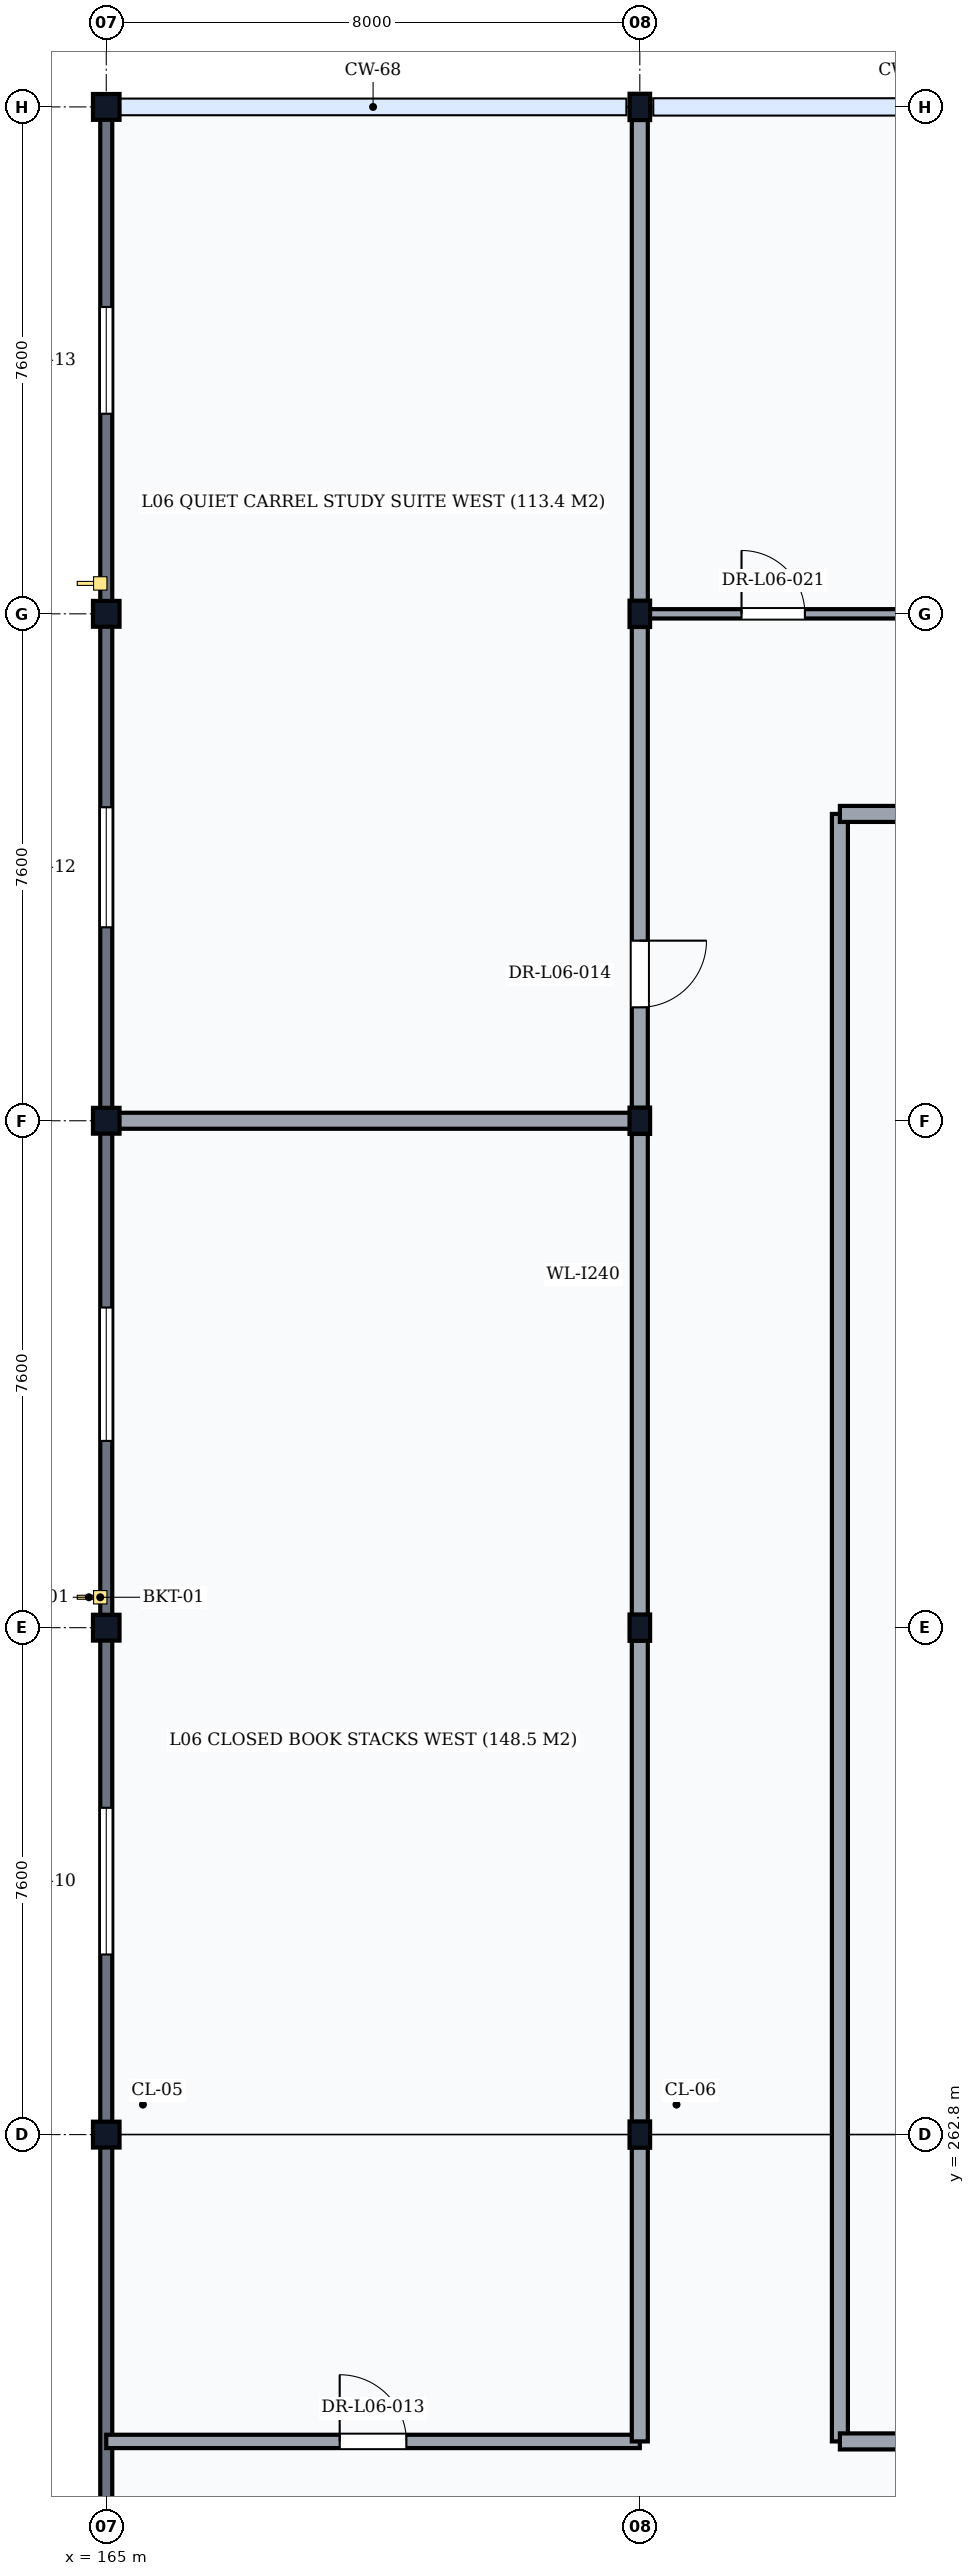
"""IFC4 building model, lengths in metres.
Left out: names, types, materials, properties, quantities, classifications, styles, units other than length and angle.
Written with IfcOpenShell. Run it as: python <this file> out.ifc"""

import sys

from ifc_helpers import new_model, si_unit, direction, frame, frame_2d, origin, origin_2d, place, context, subcontext, project, spatial, rectangle, i_section, extrude, element, fill, save


model = new_model("IFC4")
c1 = context("Model", 3, precision=1e-05, world=origin(), true_north=direction((0.0, 1.0)))
c2 = subcontext(c1, "Body", "Model", "MODEL_VIEW")
j1 = project(units=[si_unit("LENGTHUNIT", "METRE"), si_unit("PLANEANGLEUNIT", "RADIAN")], contexts=[c1])
p1 = place(None, origin())
s1 = spatial("IfcSite", under=j1, at=p1, CompositionType="ELEMENT")
p2 = place(p1, origin())
s2 = spatial("IfcBuilding", under=s1, at=p2, CompositionType="ELEMENT")
p3 = place(p2, frame((0.0, 0.0, 24.3)))
s3 = spatial("IfcBuildingStorey", under=s2, at=p3, CompositionType="ELEMENT", Elevation=24.3)
for number, where, z_axis, x_axis in (
    (1, (165.0, 262.8, 0.0), (0.0, 0.0, 1.0), (1.0, 0.0, 0.0)),
    (2, (165.0, 270.4, 0.0), (0.0, 0.0, 1.0), (1.0, 0.0, 0.0)),
    (3, (165.0, 278.0, 0.0), (0.0, 0.0, 1.0), (1.0, 0.0, 0.0)),
    (4, (165.0, 285.6, 0.0), (0.0, 0.0, 1.0), (1.0, 0.0, 0.0)),
    (5, (165.0, 293.2, 0.0), (0.0, 0.0, 1.0), (1.0, 0.0, 0.0)),
):
    element("IfcColumn", number, at=place(p3, frame(where, z_axis=z_axis, x_axis=x_axis)), inside=s3, PredefinedType="COLUMN", context=c2, shape_type="SweptSolid", body=[
        extrude(i_section(OverallWidth=0.398, OverallDepth=0.387, WebThickness=0.021, FlangeThickness=0.033, FilletRadius=0.015, at=origin_2d()), origin(), (0.0, 0.0, 1.0), 3.9),
    ])
for number, where, z_axis, x_axis in (
    (6, (173.0, 262.8, 0.0), (0.0, 0.0, 1.0), (1.0, 0.0, 0.0)),
    (7, (173.0, 270.4, 0.0), (0.0, 0.0, 1.0), (1.0, 0.0, 0.0)),
    (8, (173.0, 278.0, 0.0), (0.0, 0.0, 1.0), (1.0, 0.0, 0.0)),
    (9, (173.0, 285.6, 0.0), (0.0, 0.0, 1.0), (1.0, 0.0, 0.0)),
    (10, (173.0, 293.2, 0.0), (0.0, 0.0, 1.0), (1.0, 0.0, 0.0)),
):
    element("IfcColumn", number, at=place(p3, frame(where, z_axis=z_axis, x_axis=x_axis)), inside=s3, PredefinedType="COLUMN", context=c2, shape_type="SweptSolid", body=[
        extrude(i_section(OverallWidth=0.308, OverallDepth=0.395, WebThickness=0.021, FlangeThickness=0.04, FilletRadius=0.027, at=origin_2d()), origin(), (0.0, 0.0, 1.0), 3.9),
    ])
p4 = place(p3, frame((165.0, 255.206, 0.0), z_axis=(0.0, 0.0, 1.0), x_axis=(0.0, 1.0, 0.0)))
e11 = element("IfcWall", 11, at=p4, inside=s3, PredefinedType="SOLIDWALL", context=c2, shape_type="SweptSolid", body=[
    extrude(rectangle(XDim=7.588, YDim=0.18, at=frame_2d((3.794, 0.0))), origin(), (0.0, 0.0, 1.0), 3.388),
])
p5 = place(p3, frame((165.0, 262.806, 0.0), z_axis=(0.0, 0.0, 1.0), x_axis=(0.0, 1.0, 0.0)))
e12 = element("IfcWall", 12, at=p5, inside=s3, PredefinedType="SOLIDWALL", context=c2, shape_type="SweptSolid", body=[
    extrude(rectangle(XDim=7.588, YDim=0.18, at=frame_2d((3.794, 0.0))), origin(), (0.0, 0.0, 1.0), 3.388),
])
p6 = place(p5, frame((2.694, 0.0, 0.95)))
e13 = element("IfcOpeningElement", 13, at=p6, cuts=e12, PredefinedType="OPENING", context=c2, shape_type="SweptSolid", body=[
    extrude(rectangle(XDim=2.2, YDim=2.1, at=frame_2d((1.1, 1.05))), frame((0.0, 0.105, 0.0), z_axis=(0.0, -1.0, 0.0), x_axis=(1.0, 0.0, 0.0)), (0.0, 0.0, 1.0), 0.21),
])
p7 = place(p3, frame((165.0, 270.406, 0.0), z_axis=(0.0, 0.0, 1.0), x_axis=(0.0, 1.0, 0.0)))
e14 = element("IfcWall", 14, at=p7, inside=s3, PredefinedType="SOLIDWALL", context=c2, shape_type="SweptSolid", body=[
    extrude(rectangle(XDim=7.588, YDim=0.18, at=frame_2d((3.794, 0.0))), origin(), (0.0, 0.0, 1.0), 3.388),
])
p8 = place(p7, frame((2.794, 0.0, 0.95)))
e15 = element("IfcOpeningElement", 15, at=p8, cuts=e14, PredefinedType="OPENING", context=c2, shape_type="SweptSolid", body=[
    extrude(rectangle(XDim=2.0, YDim=2.1, at=frame_2d((1.0, 1.05))), frame((0.0, 0.105, 0.0), z_axis=(0.0, -1.0, 0.0), x_axis=(1.0, 0.0, 0.0)), (0.0, 0.0, 1.0), 0.21),
])
p9 = place(p3, frame((165.0, 278.006, 0.0), z_axis=(0.0, 0.0, 1.0), x_axis=(0.0, 1.0, 0.0)))
e16 = element("IfcWall", 16, at=p9, inside=s3, PredefinedType="SOLIDWALL", context=c2, shape_type="SweptSolid", body=[
    extrude(rectangle(XDim=7.588, YDim=0.18, at=frame_2d((3.794, 0.0))), origin(), (0.0, 0.0, 1.0), 3.388),
])
p10 = place(p9, frame((2.894, 0.0, 0.95)))
e17 = element("IfcOpeningElement", 17, at=p10, cuts=e16, PredefinedType="OPENING", context=c2, shape_type="SweptSolid", body=[
    extrude(rectangle(XDim=1.8, YDim=2.0, at=frame_2d((0.9, 1.0))), frame((0.0, 0.105, 0.0), z_axis=(0.0, -1.0, 0.0), x_axis=(1.0, 0.0, 0.0)), (0.0, 0.0, 1.0), 0.21),
])
p11 = place(p3, frame((165.0, 285.606, 0.0), z_axis=(0.0, 0.0, 1.0), x_axis=(0.0, 1.0, 0.0)))
e18 = element("IfcWall", 18, at=p11, inside=s3, PredefinedType="SOLIDWALL", context=c2, shape_type="SweptSolid", body=[
    extrude(rectangle(XDim=7.588, YDim=0.18, at=frame_2d((3.794, 0.0))), origin(), (0.0, 0.0, 1.0), 3.388),
])
p12 = place(p11, frame((2.994, 0.0, 0.95)))
e19 = element("IfcOpeningElement", 19, at=p12, cuts=e18, PredefinedType="OPENING", context=c2, shape_type="SweptSolid", body=[
    extrude(rectangle(XDim=1.6, YDim=2.0, at=frame_2d((0.8, 1.0))), frame((0.0, 0.105, 0.0), z_axis=(0.0, -1.0, 0.0), x_axis=(1.0, 0.0, 0.0)), (0.0, 0.0, 1.0), 0.21),
])
p13 = place(p3, frame((165.0, 258.2, 0.0), z_axis=(0.0, 0.0, 1.0), x_axis=(1.0, 0.0, 0.0)))
e20 = element("IfcWall", 20, at=p13, inside=s3, PredefinedType="PARTITIONING", context=c2, shape_type="SweptSolid", body=[
    extrude(rectangle(XDim=8.0, YDim=0.2, at=frame_2d((4.0, 0.0))), origin(), (0.0, 0.0, 1.0), 3.66),
])
p14 = place(p13, frame((3.5, 0.0, 0.0)))
e21 = element("IfcOpeningElement", 21, at=p14, cuts=e20, PredefinedType="OPENING", context=c2, shape_type="SweptSolid", body=[
    extrude(rectangle(XDim=1.0, YDim=2.1, at=frame_2d((0.5, 1.05))), frame((0.0, 0.115, 0.0), z_axis=(0.0, -1.0, 0.0), x_axis=(1.0, 0.0, 0.0)), (0.0, 0.0, 1.0), 0.23),
])
p15 = place(p3, frame((173.0, 258.2, 0.0), z_axis=(0.0, 0.0, 1.0), x_axis=(0.0, 1.0, 0.0)))
e22 = element("IfcWall", 22, at=p15, inside=s3, PredefinedType="PARTITIONING", context=c2, shape_type="SweptSolid", body=[
    extrude(rectangle(XDim=35.0, YDim=0.24, at=frame_2d((17.5, 0.0))), origin(), (0.0, 0.0, 1.0), 3.208),
])
p16 = place(p15, frame((21.5, 0.0, 0.0)))
e23 = element("IfcOpeningElement", 23, at=p16, cuts=e22, PredefinedType="OPENING", context=c2, shape_type="SweptSolid", body=[
    extrude(rectangle(XDim=1.0, YDim=2.1, at=frame_2d((0.5, 1.05))), frame((0.0, 0.135, 0.0), z_axis=(0.0, -1.0, 0.0), x_axis=(1.0, 0.0, 0.0)), (0.0, 0.0, 1.0), 0.27),
])
p17 = place(p3, frame((165.0, 278.0, 0.0), z_axis=(0.0, 0.0, 1.0), x_axis=(1.0, 0.0, 0.0)))
e24 = element("IfcWall", 24, at=p17, inside=s3, PredefinedType="PARTITIONING", context=c2, shape_type="SweptSolid", body=[
    extrude(rectangle(XDim=8.0, YDim=0.24, at=frame_2d((4.0, 0.0))), origin(), (0.0, 0.0, 1.0), 3.058),
])
p18 = place(p3, frame((176.0, 258.2, 0.0), z_axis=(0.0, 0.0, 1.0), x_axis=(0.0, 1.0, 0.0)))
e25 = element("IfcWall", 25, at=p18, inside=s3, PredefinedType="PARTITIONING", context=c2, shape_type="SweptSolid", body=[
    extrude(rectangle(XDim=24.4, YDim=0.24, at=frame_2d((12.2, 0.0))), origin(), (0.0, 0.0, 1.0), 3.66),
])
p19 = place(p3, frame((176.0, 258.2, 0.0), z_axis=(0.0, 0.0, 1.0), x_axis=(1.0, 0.0, 0.0)))
e26 = element("IfcWall", 26, at=p19, inside=s3, PredefinedType="PARTITIONING", context=c2, shape_type="SweptSolid", body=[
    extrude(rectangle(XDim=45.0, YDim=0.24, at=frame_2d((22.5, 0.0))), origin(), (0.0, 0.0, 1.0), 3.66),
])
p20 = place(p19, frame((5.8, 0.0, 0.0)))
e27 = element("IfcOpeningElement", 27, at=p20, cuts=e26, PredefinedType="OPENING", context=c2, shape_type="SweptSolid", body=[
    extrude(rectangle(XDim=1.4, YDim=2.1, at=frame_2d((0.7, 1.05))), frame((0.0, 0.135, 0.0), z_axis=(0.0, -1.0, 0.0), x_axis=(1.0, 0.0, 0.0)), (0.0, 0.0, 1.0), 0.27),
])
p21 = place(p19, frame((19.06, 0.0, 0.0)))
e28 = element("IfcOpeningElement", 28, at=p21, cuts=e26, PredefinedType="OPENING", context=c2, shape_type="SweptSolid", body=[
    extrude(rectangle(XDim=1.4, YDim=2.1, at=frame_2d((0.7, 1.05))), frame((0.0, 0.135, 0.0), z_axis=(0.0, -1.0, 0.0), x_axis=(1.0, 0.0, 0.0)), (0.0, 0.0, 1.0), 0.27),
])
p22 = place(p19, frame((35.06, 0.0, 0.0)))
e29 = element("IfcOpeningElement", 29, at=p22, cuts=e26, PredefinedType="OPENING", context=c2, shape_type="SweptSolid", body=[
    extrude(rectangle(XDim=1.4, YDim=2.1, at=frame_2d((0.7, 1.05))), frame((0.0, 0.135, 0.0), z_axis=(0.0, -1.0, 0.0), x_axis=(1.0, 0.0, 0.0)), (0.0, 0.0, 1.0), 0.27),
])
p23 = place(p3, frame((176.0, 282.6, 0.0), z_axis=(0.0, 0.0, 1.0), x_axis=(1.0, 0.0, 0.0)))
e30 = element("IfcWall", 30, at=p23, inside=s3, PredefinedType="PARTITIONING", context=c2, shape_type="SweptSolid", body=[
    extrude(rectangle(XDim=45.0, YDim=0.24, at=frame_2d((22.5, 0.0))), origin(), (0.0, 0.0, 1.0), 3.66),
])
p24 = place(p23, frame((6.0, 0.0, 0.0)))
e31 = element("IfcOpeningElement", 31, at=p24, cuts=e30, PredefinedType="OPENING", context=c2, shape_type="SweptSolid", body=[
    extrude(rectangle(XDim=1.0, YDim=2.1, at=frame_2d((0.5, 1.05))), frame((0.0, 0.135, 0.0), z_axis=(0.0, -1.0, 0.0), x_axis=(1.0, 0.0, 0.0)), (0.0, 0.0, 1.0), 0.27),
])
p25 = place(p23, frame((19.46, 0.0, 0.0)))
e32 = element("IfcOpeningElement", 32, at=p25, cuts=e30, PredefinedType="OPENING", context=c2, shape_type="SweptSolid", body=[
    extrude(rectangle(XDim=1.0, YDim=2.1, at=frame_2d((0.5, 1.05))), frame((0.0, 0.135, 0.0), z_axis=(0.0, -1.0, 0.0), x_axis=(1.0, 0.0, 0.0)), (0.0, 0.0, 1.0), 0.27),
])
p26 = place(p23, frame((35.46, 0.0, 0.0)))
e33 = element("IfcOpeningElement", 33, at=p26, cuts=e30, PredefinedType="OPENING", context=c2, shape_type="SweptSolid", body=[
    extrude(rectangle(XDim=1.0, YDim=2.1, at=frame_2d((0.5, 1.05))), frame((0.0, 0.135, 0.0), z_axis=(0.0, -1.0, 0.0), x_axis=(1.0, 0.0, 0.0)), (0.0, 0.0, 1.0), 0.27),
])
p27 = place(p3, frame((173.0, 285.6, 0.0), z_axis=(0.0, 0.0, 1.0), x_axis=(1.0, 0.0, 0.0)))
e34 = element("IfcWall", 34, at=p27, inside=s3, PredefinedType="PARTITIONING", context=c2, shape_type="SweptSolid", body=[
    extrude(rectangle(XDim=48.0, YDim=0.14, at=frame_2d((24.0, 0.0))), origin(), (0.0, 0.0, 1.0), 3.058),
])
p28 = place(p27, frame((1.525, 0.0, 0.0)))
e35 = element("IfcOpeningElement", 35, at=p28, cuts=e34, PredefinedType="OPENING", context=c2, shape_type="SweptSolid", body=[
    extrude(rectangle(XDim=0.95, YDim=2.1, at=frame_2d((0.475, 1.05))), frame((0.0, 0.085, 0.0), z_axis=(0.0, -1.0, 0.0), x_axis=(1.0, 0.0, 0.0)), (0.0, 0.0, 1.0), 0.17),
])
p29 = place(p27, frame((5.525, 0.0, 0.0)))
e36 = element("IfcOpeningElement", 36, at=p29, cuts=e34, PredefinedType="OPENING", context=c2, shape_type="SweptSolid", body=[
    extrude(rectangle(XDim=0.95, YDim=2.1, at=frame_2d((0.475, 1.05))), frame((0.0, 0.085, 0.0), z_axis=(0.0, -1.0, 0.0), x_axis=(1.0, 0.0, 0.0)), (0.0, 0.0, 1.0), 0.17),
])
p30 = place(p27, frame((11.25, 0.0, 0.0)))
e37 = element("IfcOpeningElement", 37, at=p30, cuts=e34, PredefinedType="OPENING", context=c2, shape_type="SweptSolid", body=[
    extrude(rectangle(XDim=1.5, YDim=2.25, at=frame_2d((0.75, 1.125))), frame((0.0, 0.085, 0.0), z_axis=(0.0, -1.0, 0.0), x_axis=(1.0, 0.0, 0.0)), (0.0, 0.0, 1.0), 0.17),
])
p31 = place(p27, frame((17.525, 0.0, 0.0)))
e38 = element("IfcOpeningElement", 38, at=p31, cuts=e34, PredefinedType="OPENING", context=c2, shape_type="SweptSolid", body=[
    extrude(rectangle(XDim=0.95, YDim=2.1, at=frame_2d((0.475, 1.05))), frame((0.0, 0.085, 0.0), z_axis=(0.0, -1.0, 0.0), x_axis=(1.0, 0.0, 0.0)), (0.0, 0.0, 1.0), 0.17),
])
p32 = place(p27, frame((21.525, 0.0, 0.0)))
e39 = element("IfcOpeningElement", 39, at=p32, cuts=e34, PredefinedType="OPENING", context=c2, shape_type="SweptSolid", body=[
    extrude(rectangle(XDim=0.95, YDim=2.1, at=frame_2d((0.475, 1.05))), frame((0.0, 0.085, 0.0), z_axis=(0.0, -1.0, 0.0), x_axis=(1.0, 0.0, 0.0)), (0.0, 0.0, 1.0), 0.17),
])
p33 = place(p27, frame((27.525, 0.0, 0.0)))
e40 = element("IfcOpeningElement", 40, at=p33, cuts=e34, PredefinedType="OPENING", context=c2, shape_type="SweptSolid", body=[
    extrude(rectangle(XDim=0.95, YDim=2.1, at=frame_2d((0.475, 1.05))), frame((0.0, 0.085, 0.0), z_axis=(0.0, -1.0, 0.0), x_axis=(1.0, 0.0, 0.0)), (0.0, 0.0, 1.0), 0.17),
])
p34 = place(p27, frame((35.25, 0.0, 0.0)))
e41 = element("IfcOpeningElement", 41, at=p34, cuts=e34, PredefinedType="OPENING", context=c2, shape_type="SweptSolid", body=[
    extrude(rectangle(XDim=1.5, YDim=2.25, at=frame_2d((0.75, 1.125))), frame((0.0, 0.085, 0.0), z_axis=(0.0, -1.0, 0.0), x_axis=(1.0, 0.0, 0.0)), (0.0, 0.0, 1.0), 0.17),
])
p35 = place(p27, frame((43.525, 0.0, 0.0)))
e42 = element("IfcOpeningElement", 42, at=p35, cuts=e34, PredefinedType="OPENING", context=c2, shape_type="SweptSolid", body=[
    extrude(rectangle(XDim=0.95, YDim=2.1, at=frame_2d((0.475, 1.05))), frame((0.0, 0.085, 0.0), z_axis=(0.0, -1.0, 0.0), x_axis=(1.0, 0.0, 0.0)), (0.0, 0.0, 1.0), 0.17),
])
p36 = place(p6, origin())
e43 = element("IfcWindow", 43, at=p36, inside=s3, PartitioningType="DOUBLE_PANEL_VERTICAL", PredefinedType="WINDOW", context=c2, shape_type="SweptSolid", body=[
    extrude(rectangle(XDim=2.2, YDim=2.1, at=frame_2d((1.1, 1.05))), frame((0.0, 0.03, 0.0), z_axis=(0.0, -1.0, 0.0), x_axis=(1.0, 0.0, 0.0)), (0.0, 0.0, 1.0), 0.06),
])
fill(e13, e43)
p37 = place(p8, origin())
e44 = element("IfcWindow", 44, at=p37, inside=s3, PartitioningType="DOUBLE_PANEL_VERTICAL", PredefinedType="WINDOW", context=c2, shape_type="SweptSolid", body=[
    extrude(rectangle(XDim=2.0, YDim=2.1, at=frame_2d((1.0, 1.05))), frame((0.0, 0.03, 0.0), z_axis=(0.0, -1.0, 0.0), x_axis=(1.0, 0.0, 0.0)), (0.0, 0.0, 1.0), 0.06),
])
fill(e15, e44)
p38 = place(p10, origin())
e45 = element("IfcWindow", 45, at=p38, inside=s3, PartitioningType="DOUBLE_PANEL_VERTICAL", PredefinedType="WINDOW", context=c2, shape_type="SweptSolid", body=[
    extrude(rectangle(XDim=1.8, YDim=2.0, at=frame_2d((0.9, 1.0))), frame((0.0, 0.03, 0.0), z_axis=(0.0, -1.0, 0.0), x_axis=(1.0, 0.0, 0.0)), (0.0, 0.0, 1.0), 0.06),
])
fill(e17, e45)
p39 = place(p12, origin())
e46 = element("IfcWindow", 46, at=p39, inside=s3, PartitioningType="SINGLE_PANEL", PredefinedType="WINDOW", context=c2, shape_type="SweptSolid", body=[
    extrude(rectangle(XDim=1.6, YDim=2.0, at=frame_2d((0.8, 1.0))), frame((0.0, 0.03, 0.0), z_axis=(0.0, -1.0, 0.0), x_axis=(1.0, 0.0, 0.0)), (0.0, 0.0, 1.0), 0.06),
])
fill(e19, e46)
p40 = place(p14, origin())
e47 = element("IfcDoor", 47, at=p40, inside=s3, OperationType="SINGLE_SWING_LEFT", PredefinedType="DOOR", context=c2, shape_type="SweptSolid", body=[
    extrude(rectangle(XDim=1.0, YDim=2.1, at=frame_2d((0.5, 1.05))), frame((0.0, 0.025, 0.0), z_axis=(0.0, -1.0, 0.0), x_axis=(1.0, 0.0, 0.0)), (0.0, 0.0, 1.0), 0.05),
])
fill(e21, e47)
p41 = place(p16, origin())
e48 = element("IfcDoor", 48, at=p41, inside=s3, OperationType="SINGLE_SWING_RIGHT", PredefinedType="DOOR", context=c2, shape_type="SweptSolid", body=[
    extrude(rectangle(XDim=1.0, YDim=2.1, at=frame_2d((0.5, 1.05))), frame((0.0, 0.025, 0.0), z_axis=(0.0, -1.0, 0.0), x_axis=(1.0, 0.0, 0.0)), (0.0, 0.0, 1.0), 0.05),
])
fill(e23, e48)
p42 = place(p28, origin())
e49 = element("IfcDoor", 49, at=p42, inside=s3, OperationType="SINGLE_SWING_LEFT", PredefinedType="DOOR", context=c2, shape_type="SweptSolid", body=[
    extrude(rectangle(XDim=0.95, YDim=2.1, at=frame_2d((0.475, 1.05))), frame((0.0, 0.025, 0.0), z_axis=(0.0, -1.0, 0.0), x_axis=(1.0, 0.0, 0.0)), (0.0, 0.0, 1.0), 0.05),
])
fill(e35, e49)
save(model, sys.argv[1])
